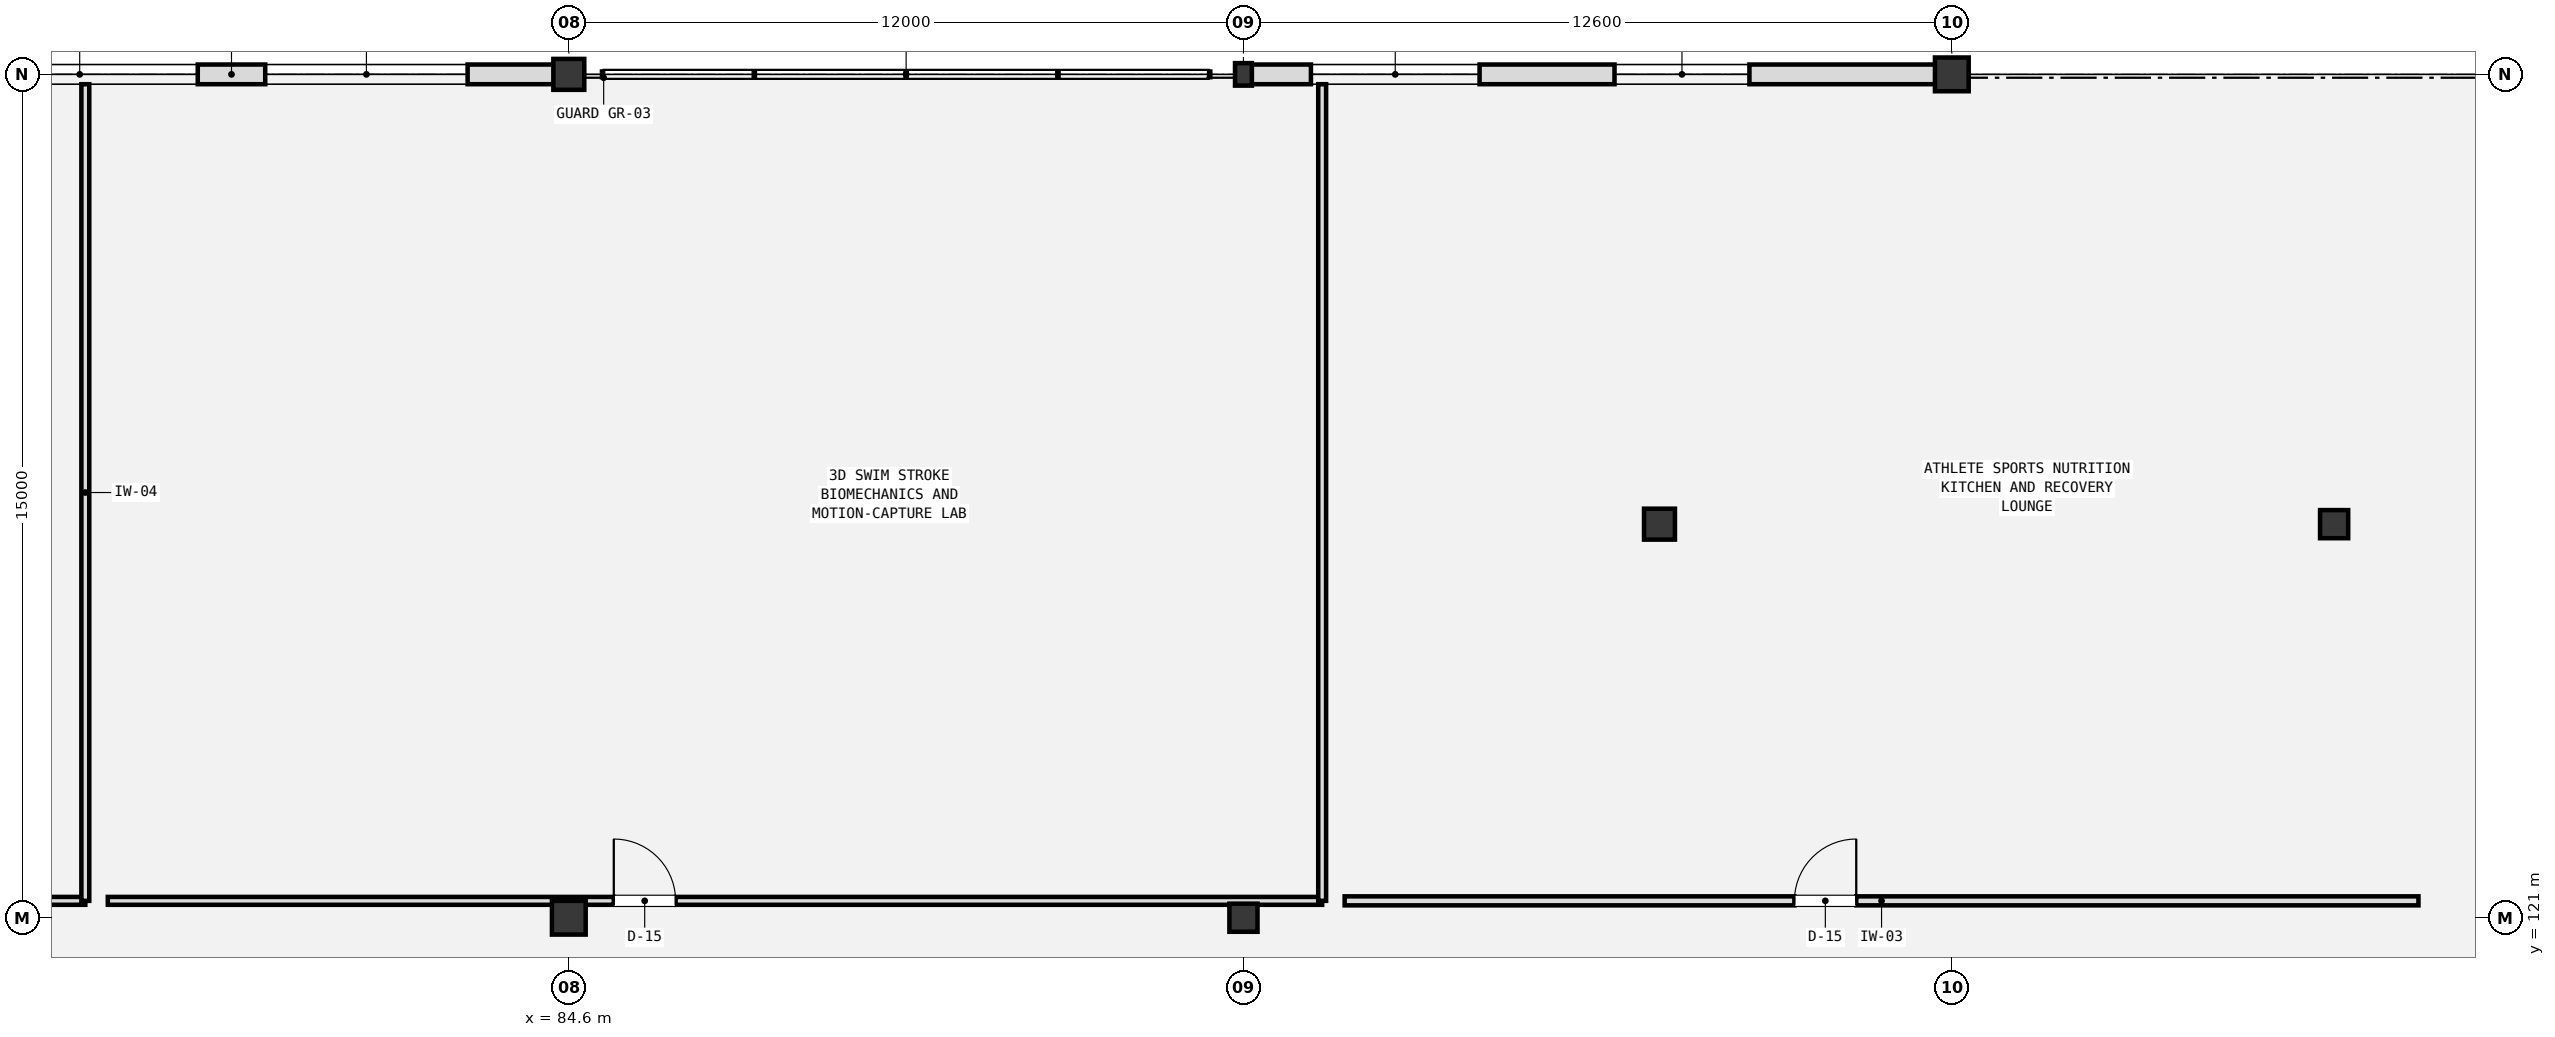
"""IFC4 building model, lengths in metres.
Left out: names, types, materials, properties, quantities, classifications, styles, units other than length and angle.
Written with IfcOpenShell. Run it as: python <this file> out.ifc"""

import sys

from ifc_helpers import new_model, si_unit, direction, frame, frame_2d, origin, origin_2d, place, context, subcontext, project, spatial, rectangle, i_section, extrude, element, fill, save


model = new_model("IFC4")
c1 = context("Model", 3, precision=1e-05, world=origin(), true_north=direction((0.0, 1.0)))
c2 = subcontext(c1, "Body", "Model", "MODEL_VIEW")
j1 = project(units=[si_unit("LENGTHUNIT", "METRE"), si_unit("PLANEANGLEUNIT", "RADIAN")], contexts=[c1])
p1 = place(None, origin())
s1 = spatial("IfcSite", under=j1, at=p1, CompositionType="ELEMENT")
p2 = place(p1, origin())
s2 = spatial("IfcBuilding", under=s1, at=p2, CompositionType="ELEMENT")
p3 = place(p2, frame((0.0, 0.0, 9.6)))
s3 = spatial("IfcBuildingStorey", under=s2, at=p3, CompositionType="ELEMENT", Elevation=9.6)
p4 = place(p3, frame((84.6, 121.0, 0.0), z_axis=(0.0, 0.0, 1.0), x_axis=(1.0, 0.0, 0.0)))
e1 = element("IfcColumn", 1, at=p4, inside=s3, PredefinedType="COLUMN", context=c2, shape_type="SweptSolid", body=[
    extrude(rectangle(XDim=0.6, YDim=0.6, at=origin_2d()), origin(), (0.0, 0.0, 1.0), 4.8),
])
p5 = place(p3, frame((84.6, 136.0, 0.0), z_axis=(0.0, 0.0, 1.0), x_axis=(1.0, 0.0, 0.0)))
e2 = element("IfcColumn", 2, at=p5, inside=s3, PredefinedType="COLUMN", context=c2, shape_type="SweptSolid", body=[
    extrude(rectangle(XDim=0.55, YDim=0.55, at=origin_2d()), origin(), (0.0, 0.0, 1.0), 4.8),
])
p6 = place(p3, frame((96.6, 121.0, 0.0), z_axis=(0.0, 0.0, 1.0), x_axis=(1.0, 0.0, 0.0)))
e3 = element("IfcColumn", 3, at=p6, inside=s3, PredefinedType="COLUMN", context=c2, shape_type="SweptSolid", body=[
    extrude(rectangle(XDim=0.5, YDim=0.5, at=origin_2d()), origin(), (0.0, 0.0, 1.0), 4.8),
])
p7 = place(p3, frame((96.6, 136.0, 0.0), z_axis=(0.0, 0.0, 1.0), x_axis=(1.0, 0.0, 0.0)))
e4 = element("IfcColumn", 4, at=p7, inside=s3, PredefinedType="COLUMN", context=c2, shape_type="SweptSolid", body=[
    extrude(i_section(OverallWidth=0.3, OverallDepth=0.4, WebThickness=0.013, FlangeThickness=0.024, FilletRadius=0.027, at=origin_2d()), origin(), (0.0, 0.0, 1.0), 4.8),
])
p8 = place(p3, frame((104.0, 128.0, 0.0), z_axis=(0.0, 0.0, 1.0), x_axis=(1.0, 0.0, 0.0)))
e5 = element("IfcColumn", 5, at=p8, inside=s3, PredefinedType="COLUMN", context=c2, shape_type="SweptSolid", body=[
    extrude(rectangle(XDim=0.55, YDim=0.55, at=origin_2d()), origin(), (0.0, 0.0, 1.0), 4.8),
])
p9 = place(p3, frame((109.2, 136.0, 0.0), z_axis=(0.0, 0.0, 1.0), x_axis=(1.0, 0.0, 0.0)))
e6 = element("IfcColumn", 6, at=p9, inside=s3, PredefinedType="COLUMN", context=c2, shape_type="SweptSolid", body=[
    extrude(rectangle(XDim=0.6, YDim=0.6, at=origin_2d()), origin(), (0.0, 0.0, 1.0), 4.8),
])
p10 = place(p3, frame((116.0, 128.0, 0.0), z_axis=(0.0, 0.0, 1.0), x_axis=(1.0, 0.0, 0.0)))
e7 = element("IfcColumn", 7, at=p10, inside=s3, PredefinedType="COLUMN", context=c2, shape_type="SweptSolid", body=[
    extrude(rectangle(XDim=0.5, YDim=0.5, at=origin_2d()), origin(), (0.0, 0.0, 1.0), 4.48),
])
p11 = place(p3, frame((72.6, 136.0, 0.0), z_axis=(0.0, 0.0, 1.0), x_axis=(1.0, 0.0, 0.0)))
e8 = element("IfcWall", 8, at=p11, inside=s3, PredefinedType="SOLIDWALL", context=c2, shape_type="SweptSolid", body=[
    extrude(rectangle(XDim=12.0, YDim=0.35, at=frame_2d((6.0, 0.0))), origin(), (0.0, 0.0, 1.0), 4.04),
])
p12 = place(p11, frame((1.2, 0.0, 0.95)))
e9 = element("IfcOpeningElement", 9, at=p12, cuts=e8, PredefinedType="OPENING", context=c2, shape_type="SweptSolid", body=[
    extrude(rectangle(XDim=4.2, YDim=1.65, at=frame_2d((2.1, 0.825))), frame((0.0, 0.185, 0.0), z_axis=(0.0, -1.0, 0.0), x_axis=(1.0, 0.0, 0.0)), (0.0, 0.0, 1.0), 0.37),
])
p13 = place(p11, frame((6.6, 0.0, 0.95)))
e10 = element("IfcOpeningElement", 10, at=p13, cuts=e8, PredefinedType="OPENING", context=c2, shape_type="SweptSolid", body=[
    extrude(rectangle(XDim=3.6, YDim=1.65, at=frame_2d((1.8, 0.825))), frame((0.0, 0.185, 0.0), z_axis=(0.0, -1.0, 0.0), x_axis=(1.0, 0.0, 0.0)), (0.0, 0.0, 1.0), 0.37),
])
p14 = place(p3, frame((96.6, 136.0, 0.0), z_axis=(0.0, 0.0, 1.0), x_axis=(1.0, 0.0, 0.0)))
e11 = element("IfcWall", 11, at=p14, inside=s3, PredefinedType="SOLIDWALL", context=c2, shape_type="SweptSolid", body=[
    extrude(rectangle(XDim=12.6, YDim=0.35, at=frame_2d((6.3, 0.0))), origin(), (0.0, 0.0, 1.0), 4.45),
])
p15 = place(p14, frame((1.2, 0.0, 0.95)))
e12 = element("IfcOpeningElement", 12, at=p15, cuts=e11, PredefinedType="OPENING", context=c2, shape_type="SweptSolid", body=[
    extrude(rectangle(XDim=3.0, YDim=1.65, at=frame_2d((1.5, 0.825))), frame((0.0, 0.185, 0.0), z_axis=(0.0, -1.0, 0.0), x_axis=(1.0, 0.0, 0.0)), (0.0, 0.0, 1.0), 0.37),
])
p16 = place(p14, frame((6.6, 0.0, 0.95)))
e13 = element("IfcOpeningElement", 13, at=p16, cuts=e11, PredefinedType="OPENING", context=c2, shape_type="SweptSolid", body=[
    extrude(rectangle(XDim=2.4, YDim=1.65, at=frame_2d((1.2, 0.825))), frame((0.0, 0.185, 0.0), z_axis=(0.0, -1.0, 0.0), x_axis=(1.0, 0.0, 0.0)), (0.0, 0.0, 1.0), 0.37),
])
p17 = place(p3, frame((52.4, 121.3, 0.0), z_axis=(0.0, 0.0, 1.0), x_axis=(1.0, 0.0, 0.0)))
e14 = element("IfcWall", 14, at=p17, inside=s3, PredefinedType="PARTITIONING", context=c2, shape_type="SweptSolid", body=[
    extrude(rectangle(XDim=23.6, YDim=0.14, at=frame_2d((11.8, 0.0))), origin(), (0.0, 0.0, 1.0), 3.3),
])
p18 = place(p17, frame((10.0, 0.0, 0.0)))
e15 = element("IfcOpeningElement", 15, at=p18, cuts=e14, PredefinedType="OPENING", context=c2, shape_type="SweptSolid", body=[
    extrude(rectangle(XDim=1.1, YDim=2.2, at=frame_2d((0.55, 1.1))), frame((0.0, 0.08, 0.0), z_axis=(0.0, -1.0, 0.0), x_axis=(1.0, 0.0, 0.0)), (0.0, 0.0, 1.0), 0.16),
])
p19 = place(p3, frame((76.0, 121.3, 0.0), z_axis=(0.0, 0.0, 1.0), x_axis=(0.0, 1.0, 0.0)))
e16 = element("IfcWall", 16, at=p19, inside=s3, PredefinedType="PARTITIONING", context=c2, shape_type="SweptSolid", body=[
    extrude(rectangle(XDim=14.525, YDim=0.14, at=frame_2d((7.262, 0.0))), origin(), (0.0, 0.0, 1.0), 3.3),
])
p20 = place(p3, frame((76.4, 121.3, 0.0), z_axis=(0.0, 0.0, 1.0), x_axis=(1.0, 0.0, 0.0)))
e17 = element("IfcWall", 17, at=p20, inside=s3, PredefinedType="PARTITIONING", context=c2, shape_type="SweptSolid", body=[
    extrude(rectangle(XDim=21.6, YDim=0.14, at=frame_2d((10.8, 0.0))), origin(), (0.0, 0.0, 1.0), 3.3),
])
p21 = place(p20, frame((9.0, 0.0, 0.0)))
e18 = element("IfcOpeningElement", 18, at=p21, cuts=e17, PredefinedType="OPENING", context=c2, shape_type="SweptSolid", body=[
    extrude(rectangle(XDim=1.1, YDim=2.2, at=frame_2d((0.55, 1.1))), frame((0.0, 0.08, 0.0), z_axis=(0.0, -1.0, 0.0), x_axis=(1.0, 0.0, 0.0)), (0.0, 0.0, 1.0), 0.16),
])
p22 = place(p3, frame((98.0, 121.3, 0.0), z_axis=(0.0, 0.0, 1.0), x_axis=(0.0, 1.0, 0.0)))
e19 = element("IfcWall", 19, at=p22, inside=s3, PredefinedType="PARTITIONING", context=c2, shape_type="SweptSolid", body=[
    extrude(rectangle(XDim=14.525, YDim=0.14, at=frame_2d((7.262, 0.0))), origin(), (0.0, 0.0, 1.0), 3.3),
])
p23 = place(p3, frame((98.4, 121.3, 0.0), z_axis=(0.0, 0.0, 1.0), x_axis=(1.0, 0.0, 0.0)))
e20 = element("IfcWall", 20, at=p23, inside=s3, PredefinedType="PLUMBINGWALL", context=c2, shape_type="SweptSolid", body=[
    extrude(rectangle(XDim=19.1, YDim=0.16, at=frame_2d((9.55, 0.0))), origin(), (0.0, 0.0, 1.0), 3.3),
])
p24 = place(p23, frame((8.0, 0.0, 0.0)))
e21 = element("IfcOpeningElement", 21, at=p24, cuts=e20, PredefinedType="OPENING", context=c2, shape_type="SweptSolid", body=[
    extrude(rectangle(XDim=1.1, YDim=2.2, at=frame_2d((0.55, 1.1))), frame((0.0, 0.09, 0.0), z_axis=(0.0, -1.0, 0.0), x_axis=(1.0, 0.0, 0.0)), (0.0, 0.0, 1.0), 0.18),
])
p25 = place(p12, origin())
e22 = element("IfcWindow", 22, at=p25, inside=s3, PartitioningType="TRIPLE_PANEL_HORIZONTAL", PredefinedType="WINDOW", context=c2, shape_type="SweptSolid", body=[
    extrude(rectangle(XDim=4.2, YDim=1.65, at=frame_2d((2.1, 0.825))), frame((0.0, 0.03, 0.0), z_axis=(0.0, -1.0, 0.0), x_axis=(1.0, 0.0, 0.0)), (0.0, 0.0, 1.0), 0.06),
])
fill(e9, e22)
p26 = place(p13, origin())
e23 = element("IfcWindow", 23, at=p26, inside=s3, PartitioningType="TRIPLE_PANEL_HORIZONTAL", PredefinedType="WINDOW", context=c2, shape_type="SweptSolid", body=[
    extrude(rectangle(XDim=3.6, YDim=1.65, at=frame_2d((1.8, 0.825))), frame((0.0, 0.03, 0.0), z_axis=(0.0, -1.0, 0.0), x_axis=(1.0, 0.0, 0.0)), (0.0, 0.0, 1.0), 0.06),
])
fill(e10, e23)
p27 = place(p15, origin())
e24 = element("IfcWindow", 24, at=p27, inside=s3, PartitioningType="DOUBLE_PANEL_HORIZONTAL", PredefinedType="WINDOW", context=c2, shape_type="SweptSolid", body=[
    extrude(rectangle(XDim=3.0, YDim=1.65, at=frame_2d((1.5, 0.825))), frame((0.0, 0.03, 0.0), z_axis=(0.0, -1.0, 0.0), x_axis=(1.0, 0.0, 0.0)), (0.0, 0.0, 1.0), 0.06),
])
fill(e12, e24)
p28 = place(p16, origin())
e25 = element("IfcWindow", 25, at=p28, inside=s3, PartitioningType="DOUBLE_PANEL_VERTICAL", PredefinedType="WINDOW", context=c2, shape_type="SweptSolid", body=[
    extrude(rectangle(XDim=2.4, YDim=1.65, at=frame_2d((1.2, 0.825))), frame((0.0, 0.03, 0.0), z_axis=(0.0, -1.0, 0.0), x_axis=(1.0, 0.0, 0.0)), (0.0, 0.0, 1.0), 0.06),
])
fill(e13, e25)
p29 = place(p21, origin())
e26 = element("IfcDoor", 26, at=p29, inside=s3, OperationType="SINGLE_SWING_LEFT", PredefinedType="DOOR", context=c2, shape_type="SweptSolid", body=[
    extrude(rectangle(XDim=1.1, YDim=2.2, at=frame_2d((0.55, 1.1))), frame((0.0, 0.025, 0.0), z_axis=(0.0, -1.0, 0.0), x_axis=(1.0, 0.0, 0.0)), (0.0, 0.0, 1.0), 0.05),
])
fill(e18, e26)
p30 = place(p24, origin())
e27 = element("IfcDoor", 27, at=p30, inside=s3, OperationType="SINGLE_SWING_RIGHT", PredefinedType="DOOR", context=c2, shape_type="SweptSolid", body=[
    extrude(rectangle(XDim=1.1, YDim=2.2, at=frame_2d((0.55, 1.1))), frame((0.0, 0.025, 0.0), z_axis=(0.0, -1.0, 0.0), x_axis=(1.0, 0.0, 0.0)), (0.0, 0.0, 1.0), 0.05),
])
fill(e21, e27)
save(model, sys.argv[1])
